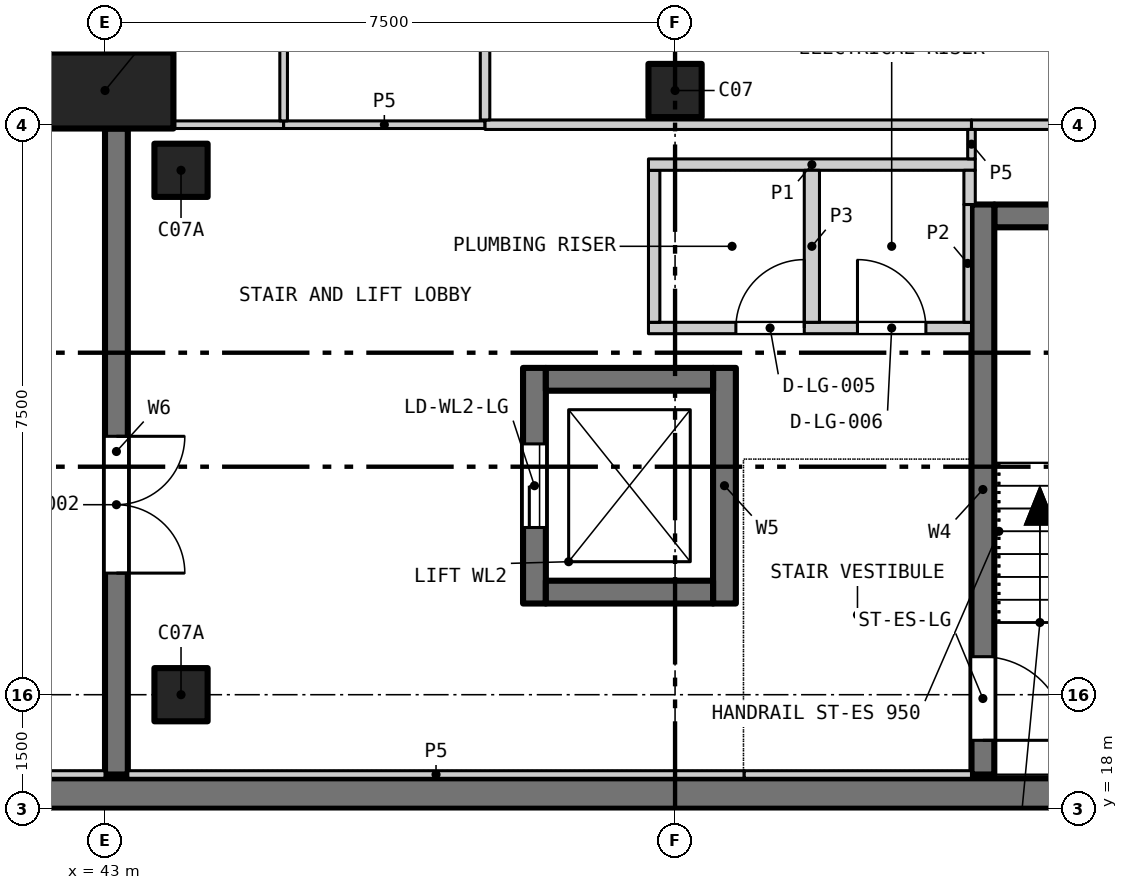
"""IFC4 building model, lengths in metres.
Left out: names, types, materials, properties, quantities, classifications, styles, units other than length and angle.
Written with IfcOpenShell. Run it as: python <this file> out.ifc"""

import sys

from ifc_helpers import new_model, si_unit, direction, frame, frame_2d, origin, origin_2d, place, context, subcontext, project, spatial, rectangle, extrude, element, fill, save


model = new_model("IFC4")
c1 = context("Model", 3, precision=1e-05, world=origin(), true_north=direction((0.0, 1.0)))
c2 = subcontext(c1, "Body", "Model", "MODEL_VIEW")
j1 = project(units=[si_unit("LENGTHUNIT", "METRE"), si_unit("PLANEANGLEUNIT", "RADIAN")], contexts=[c1])
p1 = place(None, origin())
s1 = spatial("IfcSite", under=j1, at=p1, CompositionType="ELEMENT")
p2 = place(p1, origin())
s2 = spatial("IfcBuilding", under=s1, at=p2, CompositionType="ELEMENT")
p3 = place(p2, frame((0.0, 0.0, -5.0)))
s3 = spatial("IfcBuildingStorey", under=s2, at=p3, CompositionType="ELEMENT", Elevation=-5.0)
for number, where, z_axis, x_axis in (
    (1, (50.5, 27.45, 0.0), (0.0, 0.0, 1.0), (1.0, 0.0, 0.0)),
    (2, (44.0, 19.5, 0.0), (0.0, 0.0, 1.0), (1.0, 0.0, 0.0)),
    (3, (44.0, 26.4, 0.0), (0.0, 0.0, 1.0), (1.0, 0.0, 0.0)),
):
    element("IfcColumn", number, at=place(p3, frame(where, z_axis=z_axis, x_axis=x_axis)), inside=s3, PredefinedType="COLUMN", context=c2, shape_type="SweptSolid", body=[
        extrude(rectangle(XDim=0.7, YDim=0.7, at=origin_2d()), origin(), (0.0, 0.0, 1.0), 5.0),
    ])
p4 = place(p3, frame((0.4, 18.2, 0.0), z_axis=(0.0, 0.0, 1.0), x_axis=(1.0, 0.0, 0.0)))
e4 = element("IfcWall", 4, at=p4, inside=s3, PredefinedType="SOLIDWALL", context=c2, shape_type="SweptSolid", body=[
    extrude(rectangle(XDim=57.2, YDim=0.4, at=frame_2d((28.6, 0.0))), origin(), (0.0, 0.0, 1.0), 5.0),
])
p5 = place(p3, frame((43.15, 18.45, 0.0), z_axis=(0.0, 0.0, 1.0), x_axis=(0.0, 1.0, 0.0)))
e5 = element("IfcWall", 5, at=p5, inside=s3, PredefinedType="SOLIDWALL", context=c2, shape_type="SweptSolid", body=[
    extrude(rectangle(XDim=8.5, YDim=0.3, at=frame_2d((4.25, 0.0))), origin(), (0.0, 0.0, 1.0), 5.0),
])
p6 = place(p5, frame((2.65, 0.0, 0.0)))
e6 = element("IfcOpeningElement", 6, at=p6, cuts=e5, PredefinedType="OPENING", context=c2, shape_type="SweptSolid", body=[
    extrude(rectangle(XDim=1.8, YDim=2.1, at=frame_2d((0.9, 1.05))), frame((0.0, 0.16, 0.0), z_axis=(0.0, -1.0, 0.0), x_axis=(1.0, 0.0, 0.0)), (0.0, 0.0, 1.0), 0.32),
])
p7 = place(p3, frame((54.7, 25.8, 0.0), z_axis=(0.0, 0.0, 1.0), x_axis=(1.0, 0.0, 0.0)))
e7 = element("IfcWall", 7, at=p7, inside=s3, PredefinedType="SHEAR", context=c2, shape_type="SweptSolid", body=[
    extrude(rectangle(XDim=3.0, YDim=0.3, at=frame_2d((1.5, 0.0))), origin(), (0.0, 0.0, 1.0), 5.0),
])
p8 = place(p3, frame((54.55, 18.45, 0.0), z_axis=(0.0, 0.0, 1.0), x_axis=(0.0, 1.0, 0.0)))
e8 = element("IfcWall", 8, at=p8, inside=s3, PredefinedType="SHEAR", context=c2, shape_type="SweptSolid", body=[
    extrude(rectangle(XDim=7.5, YDim=0.3, at=frame_2d((3.75, 0.0))), origin(), (0.0, 0.0, 1.0), 5.0),
])
p9 = place(p8, frame((0.45, 0.0, 0.0)))
e9 = element("IfcOpeningElement", 9, at=p9, cuts=e8, PredefinedType="OPENING", context=c2, shape_type="SweptSolid", body=[
    extrude(rectangle(XDim=1.1, YDim=2.1, at=frame_2d((0.55, 1.05))), frame((0.0, 0.16, 0.0), z_axis=(0.0, -1.0, 0.0), x_axis=(1.0, 0.0, 0.0)), (0.0, 0.0, 1.0), 0.32),
])
p10 = place(p3, frame((48.65, 20.7, 0.0), z_axis=(0.0, 0.0, 1.0), x_axis=(0.0, 1.0, 0.0)))
e10 = element("IfcWall", 10, at=p10, inside=s3, PredefinedType="SHEAR", context=c2, shape_type="SweptSolid", body=[
    extrude(rectangle(XDim=3.1, YDim=0.3, at=frame_2d((1.55, 0.0))), origin(), (0.0, 0.0, 1.0), 5.0),
])
p11 = place(p10, frame((1.0, 0.0, 0.0)))
e11 = element("IfcOpeningElement", 11, at=p11, cuts=e10, PredefinedType="OPENING", context=c2, shape_type="SweptSolid", body=[
    extrude(rectangle(XDim=1.1, YDim=2.1, at=frame_2d((0.55, 1.05))), frame((0.0, 0.16, 0.0), z_axis=(0.0, -1.0, 0.0), x_axis=(1.0, 0.0, 0.0)), (0.0, 0.0, 1.0), 0.32),
])
p12 = place(p3, frame((51.15, 20.7, 0.0), z_axis=(0.0, 0.0, 1.0), x_axis=(0.0, 1.0, 0.0)))
e12 = element("IfcWall", 12, at=p12, inside=s3, PredefinedType="SHEAR", context=c2, shape_type="SweptSolid", body=[
    extrude(rectangle(XDim=3.1, YDim=0.3, at=frame_2d((1.55, 0.0))), origin(), (0.0, 0.0, 1.0), 5.0),
])
for number, where, z_axis, x_axis in (
    (13, (48.8, 20.85, 0.0), (0.0, 0.0, 1.0), (1.0, 0.0, 0.0)),
    (14, (48.8, 23.65, 0.0), (0.0, 0.0, 1.0), (1.0, 0.0, 0.0)),
):
    element("IfcWall", number, at=place(p3, frame(where, z_axis=z_axis, x_axis=x_axis)), inside=s3, PredefinedType="SHEAR", context=c2, shape_type="SweptSolid", body=[
        extrude(rectangle(XDim=2.2, YDim=0.3, at=frame_2d((1.1, 0.0))), origin(), (0.0, 0.0, 1.0), 5.0),
    ])
p13 = place(p3, frame((43.0, 27.45, 0.0), z_axis=(0.0, 0.0, 1.0), x_axis=(1.0, 0.0, 0.0)))
e15 = element("IfcColumn", 15, at=p13, inside=s3, PredefinedType="COLUMN", context=c2, shape_type="SweptSolid", body=[
    extrude(rectangle(XDim=1.8, YDim=1.0, at=origin_2d()), origin(), (0.0, 0.0, 1.0), 5.0),
])
p14 = place(p3, frame((50.15, 24.325, 0.0), z_axis=(0.0, 0.0, 1.0), x_axis=(1.0, 0.0, 0.0)))
e16 = element("IfcWall", 16, at=p14, inside=s3, PredefinedType="PARTITIONING", context=c2, shape_type="SweptSolid", body=[
    extrude(rectangle(XDim=4.25, YDim=0.15, at=frame_2d((2.125, 0.0))), origin(), (0.0, 0.0, 1.0), 4.7),
])
p15 = place(p14, frame((1.15, 0.0, 0.0)))
e17 = element("IfcOpeningElement", 17, at=p15, cuts=e16, PredefinedType="OPENING", context=c2, shape_type="SweptSolid", body=[
    extrude(rectangle(XDim=0.9, YDim=2.1, at=frame_2d((0.45, 1.05))), frame((0.0, 0.085, 0.0), z_axis=(0.0, -1.0, 0.0), x_axis=(1.0, 0.0, 0.0)), (0.0, 0.0, 1.0), 0.17),
])
p16 = place(p14, frame((2.75, 0.0, 0.0)))
e18 = element("IfcOpeningElement", 18, at=p16, cuts=e16, PredefinedType="OPENING", context=c2, shape_type="SweptSolid", body=[
    extrude(rectangle(XDim=0.9, YDim=2.1, at=frame_2d((0.45, 1.05))), frame((0.0, 0.085, 0.0), z_axis=(0.0, -1.0, 0.0), x_axis=(1.0, 0.0, 0.0)), (0.0, 0.0, 1.0), 0.17),
])
p17 = place(p3, frame((50.225, 24.4, 0.0), z_axis=(0.0, 0.0, 1.0), x_axis=(0.0, 1.0, 0.0)))
e19 = element("IfcWall", 19, at=p17, inside=s3, PredefinedType="PARTITIONING", context=c2, shape_type="SweptSolid", body=[
    extrude(rectangle(XDim=2.0, YDim=0.15, at=frame_2d((1.0, 0.0))), origin(), (0.0, 0.0, 1.0), 4.7),
])
p18 = place(p3, frame((50.15, 26.475, 0.0), z_axis=(0.0, 0.0, 1.0), x_axis=(1.0, 0.0, 0.0)))
e20 = element("IfcWall", 20, at=p18, inside=s3, PredefinedType="PARTITIONING", context=c2, shape_type="SweptSolid", body=[
    extrude(rectangle(XDim=4.3, YDim=0.15, at=frame_2d((2.15, 0.0))), origin(), (0.0, 0.0, 1.0), 3.3),
])
p19 = place(p3, frame((52.3, 24.4, 0.0), z_axis=(0.0, 0.0, 1.0), x_axis=(0.0, 1.0, 0.0)))
e21 = element("IfcWall", 21, at=p19, inside=s3, PredefinedType="PARTITIONING", context=c2, shape_type="SweptSolid", body=[
    extrude(rectangle(XDim=2.0, YDim=0.2, at=frame_2d((1.0, 0.0))), origin(), (0.0, 0.0, 1.0), 4.7),
])
p20 = place(p3, frame((54.35, 24.4, 0.0), z_axis=(0.0, 0.0, 1.0), x_axis=(0.0, 1.0, 0.0)))
e22 = element("IfcWall", 22, at=p20, inside=s3, PredefinedType="PARTITIONING", context=c2, shape_type="SweptSolid", body=[
    extrude(rectangle(XDim=1.55, YDim=0.1, at=frame_2d((0.775, 0.0))), origin(), (0.0, 0.0, 1.0), 4.7),
])
p21 = place(p3, frame((54.375, 25.95, 0.0), z_axis=(0.0, 0.0, 1.0), x_axis=(0.0, 1.0, 0.0)))
e23 = element("IfcWall", 23, at=p21, inside=s3, PredefinedType="PARTITIONING", context=c2, shape_type="SweptSolid", body=[
    extrude(rectangle(XDim=0.45, YDim=0.15, at=frame_2d((0.225, 0.0))), origin(), (0.0, 0.0, 1.0), 4.7),
])
p22 = place(p3, frame((15.0, 18.45, 0.0), z_axis=(0.0, 0.0, 1.0), x_axis=(1.0, 0.0, 0.0)))
e24 = element("IfcWall", 24, at=p22, inside=s3, PredefinedType="PARTITIONING", context=c2, shape_type="SweptSolid", body=[
    extrude(rectangle(XDim=28.0, YDim=0.1, at=frame_2d((14.0, 0.0))), origin(), (0.0, 0.0, 1.0), 4.65),
])
p23 = place(p3, frame((43.3, 18.45, 0.0), z_axis=(0.0, 0.0, 1.0), x_axis=(1.0, 0.0, 0.0)))
e25 = element("IfcWall", 25, at=p23, inside=s3, PredefinedType="PARTITIONING", context=c2, shape_type="SweptSolid", body=[
    extrude(rectangle(XDim=8.11, YDim=0.1, at=frame_2d((4.055, 0.0))), origin(), (0.0, 0.0, 1.0), 4.7),
])
p24 = place(p3, frame((51.41, 18.45, 0.0), z_axis=(0.0, 0.0, 1.0), x_axis=(1.0, 0.0, 0.0)))
e26 = element("IfcWall", 26, at=p24, inside=s3, PredefinedType="PARTITIONING", context=c2, shape_type="SweptSolid", body=[
    extrude(rectangle(XDim=2.99, YDim=0.1, at=frame_2d((1.495, 0.0))), origin(), (0.0, 0.0, 1.0), 4.7),
])
p25 = place(p3, frame((43.9, 27.0, 0.0), z_axis=(0.0, 0.0, 1.0), x_axis=(1.0, 0.0, 0.0)))
e27 = element("IfcWall", 27, at=p25, inside=s3, PredefinedType="PARTITIONING", context=c2, shape_type="SweptSolid", body=[
    extrude(rectangle(XDim=1.45, YDim=0.1, at=frame_2d((0.725, 0.0))), origin(), (0.0, 0.0, 1.0), 4.7),
])
p26 = place(p3, frame((45.35, 27.0, 0.0), z_axis=(0.0, 0.0, 1.0), x_axis=(1.0, 0.0, 0.0)))
e28 = element("IfcWall", 28, at=p26, inside=s3, PredefinedType="PARTITIONING", context=c2, shape_type="SweptSolid", body=[
    extrude(rectangle(XDim=2.65, YDim=0.1, at=frame_2d((1.325, 0.0))), origin(), (0.0, 0.0, 1.0), 4.7),
])
p27 = place(p3, frame((48.0, 27.0, 0.0), z_axis=(0.0, 0.0, 1.0), x_axis=(1.0, 0.0, 0.0)))
e29 = element("IfcWall", 29, at=p27, inside=s3, PredefinedType="PARTITIONING", context=c2, shape_type="SweptSolid", body=[
    extrude(rectangle(XDim=6.4, YDim=0.125, at=frame_2d((3.2, 0.0))), origin(), (0.0, 0.0, 1.0), 4.7),
])
p28 = place(p3, frame((54.4, 27.0, 0.0), z_axis=(0.0, 0.0, 1.0), x_axis=(1.0, 0.0, 0.0)))
e30 = element("IfcWall", 30, at=p28, inside=s3, PredefinedType="PARTITIONING", context=c2, shape_type="SweptSolid", body=[
    extrude(rectangle(XDim=3.2, YDim=0.125, at=frame_2d((1.6, 0.0))), origin(), (0.0, 0.0, 1.0), 4.7),
])
p29 = place(p3, frame((43.0, 27.95, 0.0), z_axis=(0.0, 0.0, 1.0), x_axis=(0.0, 1.0, 0.0)))
e31 = element("IfcWall", 31, at=p29, inside=s3, PredefinedType="PARTITIONING", context=c2, shape_type="SweptSolid", body=[
    extrude(rectangle(XDim=0.988, YDim=0.1, at=frame_2d((0.494, 0.0))), origin(), (0.0, 0.0, 1.0), 4.65),
])
p30 = place(p3, frame((45.35, 27.05, 0.0), z_axis=(0.0, 0.0, 1.0), x_axis=(0.0, 1.0, 0.0)))
e32 = element("IfcWall", 32, at=p30, inside=s3, PredefinedType="PARTITIONING", context=c2, shape_type="SweptSolid", body=[
    extrude(rectangle(XDim=1.95, YDim=0.1, at=frame_2d((0.975, 0.0))), origin(), (0.0, 0.0, 1.0), 4.7),
])
p31 = place(p3, frame((48.0, 27.062, 0.0), z_axis=(0.0, 0.0, 1.0), x_axis=(0.0, 1.0, 0.0)))
e33 = element("IfcWall", 33, at=p31, inside=s3, PredefinedType="PARTITIONING", context=c2, shape_type="SweptSolid", body=[
    extrude(rectangle(XDim=17.938, YDim=0.125, at=frame_2d((8.969, 0.0))), origin(), (0.0, 0.0, 1.0), 4.7),
])
p32 = place(p31, frame((8.45, 0.0, 0.0)))
e34 = element("IfcOpeningElement", 34, at=p32, cuts=e33, PredefinedType="OPENING", context=c2, shape_type="SweptSolid", body=[
    extrude(rectangle(XDim=1.0, YDim=2.1, at=frame_2d((0.5, 1.05))), frame((0.0, 0.073, 0.0), z_axis=(0.0, -1.0, 0.0), x_axis=(1.0, 0.0, 0.0)), (0.0, 0.0, 1.0), 0.145),
])
p33 = place(p3, frame((54.4, 26.55, 0.0), z_axis=(0.0, 0.0, 1.0), x_axis=(0.0, 1.0, 0.0)))
e35 = element("IfcWall", 35, at=p33, inside=s3, PredefinedType="PARTITIONING", context=c2, shape_type="SweptSolid", body=[
    extrude(rectangle(XDim=0.387, YDim=0.1, at=frame_2d((0.194, 0.0))), origin(), (0.0, 0.0, 1.0), 4.7),
])
p34 = place(p6, frame((1.8, 0.0, 0.0), z_axis=(0.0, 0.0, 1.0), x_axis=(-1.0, 0.0, 0.0)))
e36 = element("IfcDoor", 36, at=p34, inside=s3, OperationType="DOUBLE_DOOR_SINGLE_SWING", PredefinedType="DOOR", context=c2, shape_type="SweptSolid", body=[
    extrude(rectangle(XDim=1.8, YDim=2.1, at=frame_2d((0.9, 1.05))), frame((0.0, 0.025, 0.0), z_axis=(0.0, -1.0, 0.0), x_axis=(1.0, 0.0, 0.0)), (0.0, 0.0, 1.0), 0.05),
])
fill(e6, e36)
p35 = place(p15, origin())
e37 = element("IfcDoor", 37, at=p35, inside=s3, OperationType="SINGLE_SWING_RIGHT", PredefinedType="DOOR", context=c2, shape_type="SweptSolid", body=[
    extrude(rectangle(XDim=0.9, YDim=2.1, at=frame_2d((0.45, 1.05))), frame((0.0, 0.025, 0.0), z_axis=(0.0, -1.0, 0.0), x_axis=(1.0, 0.0, 0.0)), (0.0, 0.0, 1.0), 0.05),
])
fill(e17, e37)
p36 = place(p16, origin())
e38 = element("IfcDoor", 38, at=p36, inside=s3, OperationType="SINGLE_SWING_LEFT", PredefinedType="DOOR", context=c2, shape_type="SweptSolid", body=[
    extrude(rectangle(XDim=0.9, YDim=2.1, at=frame_2d((0.45, 1.05))), frame((0.0, 0.025, 0.0), z_axis=(0.0, -1.0, 0.0), x_axis=(1.0, 0.0, 0.0)), (0.0, 0.0, 1.0), 0.05),
])
fill(e18, e38)
p37 = place(p9, frame((1.1, 0.0, 0.0), z_axis=(0.0, 0.0, 1.0), x_axis=(-1.0, 0.0, 0.0)))
e39 = element("IfcDoor", 39, at=p37, inside=s3, OperationType="SINGLE_SWING_RIGHT", PredefinedType="DOOR", context=c2, shape_type="SweptSolid", body=[
    extrude(rectangle(XDim=1.1, YDim=2.1, at=frame_2d((0.55, 1.05))), frame((0.0, 0.025, 0.0), z_axis=(0.0, -1.0, 0.0), x_axis=(1.0, 0.0, 0.0)), (0.0, 0.0, 1.0), 0.05),
])
fill(e9, e39)
p38 = place(p11, origin())
e40 = element("IfcDoor", 40, at=p38, inside=s3, OperationType="SLIDING_TO_LEFT", PredefinedType="DOOR", context=c2, shape_type="SweptSolid", body=[
    extrude(rectangle(XDim=1.1, YDim=2.1, at=frame_2d((0.55, 1.05))), frame((0.0, 0.025, 0.0), z_axis=(0.0, -1.0, 0.0), x_axis=(1.0, 0.0, 0.0)), (0.0, 0.0, 1.0), 0.05),
])
fill(e11, e40)
save(model, sys.argv[1])
